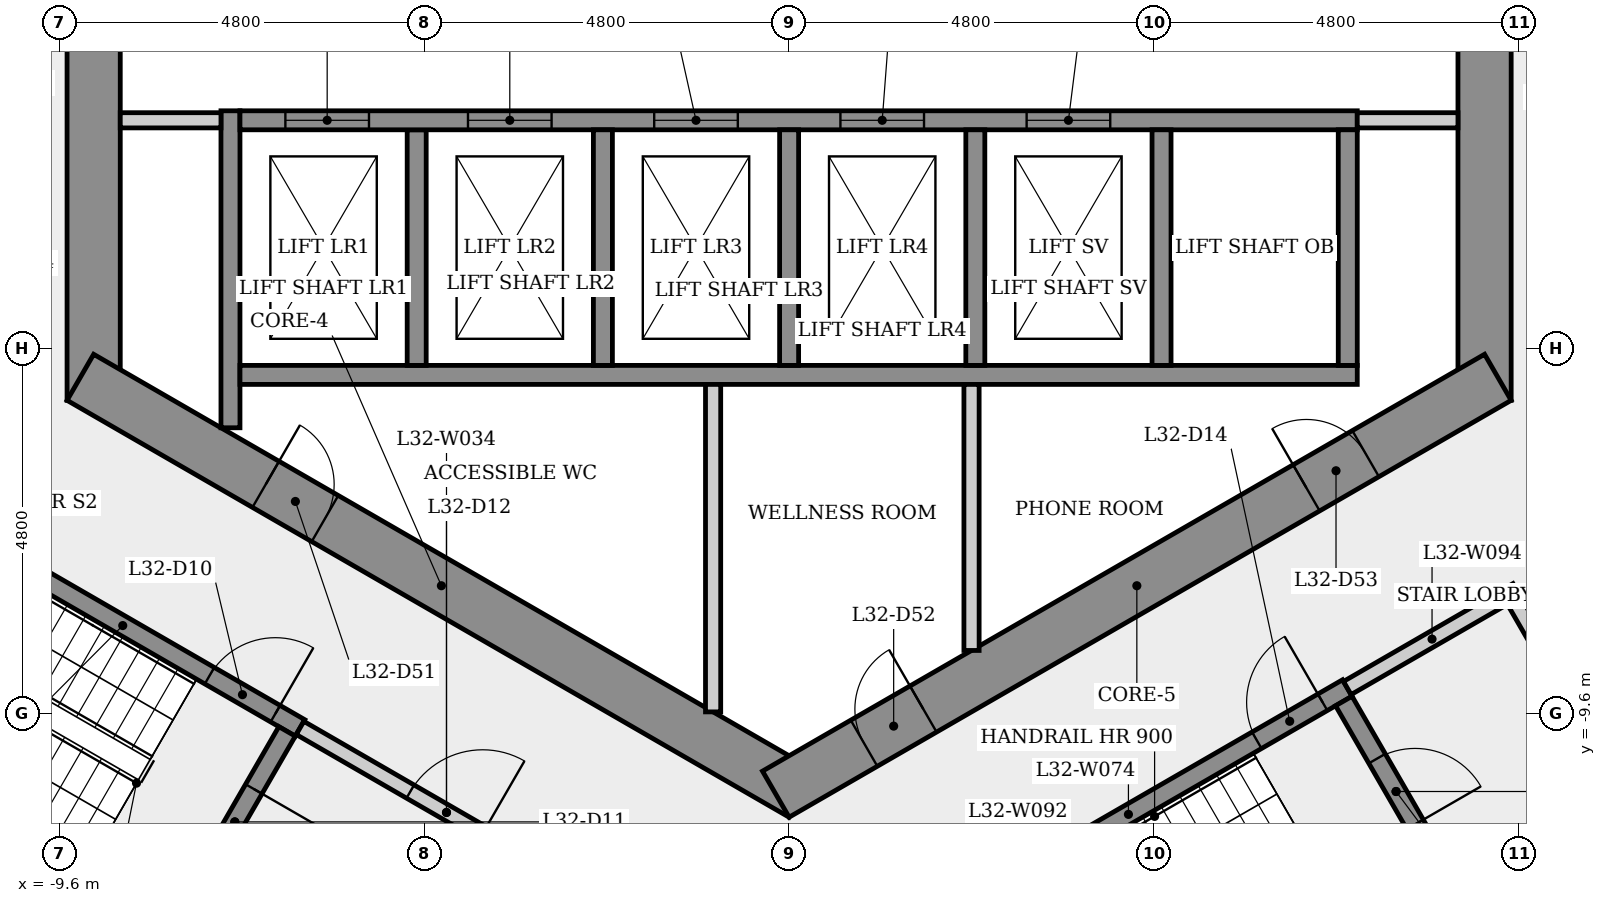
"""IFC4 building model, lengths in metres.
Left out: names, types, materials, properties, quantities, classifications, styles, units other than length and angle.
Written with IfcOpenShell. Run it as: python <this file> out.ifc"""

import sys

from ifc_helpers import new_model, si_unit, direction, frame, frame_2d, origin, place, context, subcontext, project, spatial, rectangle, extrude, element, fill, save


model = new_model("IFC4")
c1 = context("Model", 3, precision=1e-05, world=origin(), true_north=direction((0.0, 1.0)))
c2 = subcontext(c1, "Body", "Model", "MODEL_VIEW")
j1 = project(units=[si_unit("LENGTHUNIT", "METRE"), si_unit("PLANEANGLEUNIT", "RADIAN")], contexts=[c1])
p1 = place(None, origin())
s1 = spatial("IfcSite", under=j1, at=p1, CompositionType="ELEMENT")
p2 = place(p1, origin())
s2 = spatial("IfcBuilding", under=s1, at=p2, CompositionType="ELEMENT")
p3 = place(p2, frame((0.0, 0.0, 120.5)))
s3 = spatial("IfcBuildingStorey", under=s2, at=p3, CompositionType="ELEMENT", Elevation=120.5)
p4 = place(p3, frame((9.15, -5.485, 0.0), z_axis=(0.0, 0.0, 1.0), x_axis=(0.0, 1.0, 0.0)))
e1 = element("IfcWall", 1, at=p4, inside=s3, PredefinedType="SHEAR", context=c2, shape_type="SweptSolid", body=[
    extrude(rectangle(XDim=10.97, YDim=0.7, at=frame_2d((5.485, 0.0))), origin(), (0.0, 0.0, 1.0), 4.0),
])
p5 = place(p4, frame((4.685, 0.0, 0.0)))
e2 = element("IfcOpeningElement", 2, at=p5, cuts=e1, PredefinedType="OPENING", context=c2, shape_type="SweptSolid", body=[
    extrude(rectangle(XDim=1.6, YDim=2.1, at=frame_2d((0.8, 1.05))), frame((0.0, 0.36, 0.0), z_axis=(0.0, -1.0, 0.0), x_axis=(1.0, 0.0, 0.0)), (0.0, 0.0, 1.0), 0.72),
])
p6 = place(p3, frame((-9.15, 5.485, 0.0), z_axis=(0.0, 0.0, 1.0), x_axis=(0.0, -1.0, 0.0)))
e3 = element("IfcWall", 3, at=p6, inside=s3, PredefinedType="SHEAR", context=c2, shape_type="SweptSolid", body=[
    extrude(rectangle(XDim=10.97, YDim=0.7, at=frame_2d((5.485, 0.0))), origin(), (0.0, 0.0, 1.0), 4.0),
])
p7 = place(p6, frame((4.685, 0.0, 0.0)))
e4 = element("IfcOpeningElement", 4, at=p7, cuts=e3, PredefinedType="OPENING", context=c2, shape_type="SweptSolid", body=[
    extrude(rectangle(XDim=1.6, YDim=2.1, at=frame_2d((0.8, 1.05))), frame((0.0, 0.36, 0.0), z_axis=(0.0, -1.0, 0.0), x_axis=(1.0, 0.0, 0.0)), (0.0, 0.0, 1.0), 0.72),
])
p8 = place(p3, frame((-9.325, -5.182, 0.0), z_axis=(0.0, 0.0, 1.0), x_axis=(0.866023993627, -0.500002442456, 0.0)))
e5 = element("IfcWall", 5, at=p8, inside=s3, PredefinedType="SHEAR", context=c2, shape_type="SweptSolid", body=[
    extrude(rectangle(XDim=10.97, YDim=0.7, at=frame_2d((5.485, 0.0))), origin(), (0.0, 0.0, 1.0), 4.0),
])
p9 = place(p8, frame((2.817, 0.0, 0.0)))
e6 = element("IfcOpeningElement", 6, at=p9, cuts=e5, PredefinedType="OPENING", context=c2, shape_type="SweptSolid", body=[
    extrude(rectangle(XDim=0.9, YDim=2.1, at=frame_2d((0.45, 1.05))), frame((0.0, 0.36, 0.0), z_axis=(0.0, -1.0, 0.0), x_axis=(1.0, 0.0, 0.0)), (0.0, 0.0, 1.0), 0.72),
])
p10 = place(p3, frame((-0.175, -10.667, 0.0), z_axis=(0.0, 0.0, 1.0), x_axis=(0.866023993627, 0.500002442456, 0.0)))
e7 = element("IfcWall", 7, at=p10, inside=s3, PredefinedType="SHEAR", context=c2, shape_type="SweptSolid", body=[
    extrude(rectangle(XDim=10.97, YDim=0.7, at=frame_2d((5.485, 0.0))), origin(), (0.0, 0.0, 1.0), 4.0),
])
p11 = place(p10, frame((1.34, 0.0, 0.0)))
e8 = element("IfcOpeningElement", 8, at=p11, cuts=e7, PredefinedType="OPENING", context=c2, shape_type="SweptSolid", body=[
    extrude(rectangle(XDim=0.9, YDim=2.1, at=frame_2d((0.45, 1.05))), frame((0.0, 0.36, 0.0), z_axis=(0.0, -1.0, 0.0), x_axis=(1.0, 0.0, 0.0)), (0.0, 0.0, 1.0), 0.72),
])
p12 = place(p10, frame((8.061, 0.0, 0.0)))
e9 = element("IfcOpeningElement", 9, at=p12, cuts=e7, PredefinedType="OPENING", context=c2, shape_type="SweptSolid", body=[
    extrude(rectangle(XDim=0.9, YDim=2.1, at=frame_2d((0.45, 1.05))), frame((0.0, 0.36, 0.0), z_axis=(0.0, -1.0, 0.0), x_axis=(1.0, 0.0, 0.0)), (0.0, 0.0, 1.0), 0.72),
])
p13 = place(p3, frame((-11.1, -7.101, 0.0), z_axis=(0.0, 0.0, 1.0), x_axis=(0.866028615007, -0.499994437958, 0.0)))
e10 = element("IfcWall", 10, at=p13, inside=s3, PredefinedType="SHEAR", context=c2, shape_type="SweptSolid", body=[
    extrude(rectangle(XDim=5.387, YDim=0.25, at=frame_2d((2.694, 0.0))), origin(), (0.0, 0.0, 1.0), 3.6),
])
p14 = place(p13, frame((4.012, 0.0, 0.0)))
e11 = element("IfcOpeningElement", 11, at=p14, cuts=e10, PredefinedType="OPENING", context=c2, shape_type="SweptSolid", body=[
    extrude(rectangle(XDim=1.0, YDim=2.1, at=frame_2d((0.5, 1.05))), frame((0.0, 0.135, 0.0), z_axis=(0.0, -1.0, 0.0), x_axis=(1.0, 0.0, 0.0)), (0.0, 0.0, 1.0), 0.27),
])
p15 = place(p3, frame((-7.935, -12.393, 0.0), z_axis=(0.0, 0.0, 1.0), x_axis=(-0.866025499775, 0.499999833739, 0.0)))
e12 = element("IfcWall", 12, at=p15, inside=s3, PredefinedType="SHEAR", context=c2, shape_type="SweptSolid", body=[
    extrude(rectangle(XDim=6.4, YDim=0.25, at=frame_2d((3.2, 0.0))), origin(), (0.0, 0.0, 1.0), 3.6),
])
p16 = place(p3, frame((-7.35, -5.846, 0.0), z_axis=(0.0, 0.0, 1.0), x_axis=(0.0, 1.0, 0.0)))
e13 = element("IfcWall", 13, at=p16, inside=s3, PredefinedType="SHEAR", context=c2, shape_type="SweptSolid", body=[
    extrude(rectangle(XDim=4.171, YDim=0.25, at=frame_2d((2.085, 0.0))), origin(), (0.0, 0.0, 1.0), 3.6),
])
p17 = place(p3, frame((-7.475, -1.8, 0.0), z_axis=(0.0, 0.0, 1.0), x_axis=(-1.0, 0.0, 0.0)))
e14 = element("IfcWall", 14, at=p17, inside=s3, PredefinedType="PARTITIONING", context=c2, shape_type="SweptSolid", body=[
    extrude(rectangle(XDim=1.325, YDim=0.2, at=frame_2d((0.663, 0.0))), origin(), (0.0, 0.0, 1.0), 3.6),
])
p18 = place(p3, frame((-6.605, -9.841, 0.0), z_axis=(0.0, 0.0, 1.0), x_axis=(-0.499996545922, -0.866027397988, 0.0)))
e15 = element("IfcWall", 15, at=p18, inside=s3, PredefinedType="SHEAR", context=c2, shape_type="SweptSolid", body=[
    extrude(rectangle(XDim=2.75, YDim=0.25, at=frame_2d((1.375, 0.0))), origin(), (0.0, 0.0, 1.0), 3.6),
])
p19 = place(p18, frame((0.875, 0.0, 0.0)))
e16 = element("IfcOpeningElement", 16, at=p19, cuts=e15, PredefinedType="OPENING", context=c2, shape_type="SweptSolid", body=[
    extrude(rectangle(XDim=1.0, YDim=2.1, at=frame_2d((0.5, 1.05))), frame((0.0, 0.135, 0.0), z_axis=(0.0, -1.0, 0.0), x_axis=(1.0, 0.0, 0.0)), (0.0, 0.0, 1.0), 0.27),
])
p20 = place(p3, frame((-6.435, -9.795, 0.0), z_axis=(0.0, 0.0, 1.0), x_axis=(0.866012907634, -0.500021643343, 0.0)))
e17 = element("IfcWall", 17, at=p20, inside=s3, PredefinedType="PARTITIONING", context=c2, shape_type="SweptSolid", body=[
    extrude(rectangle(XDim=4.45, YDim=0.2, at=frame_2d((2.225, 0.0))), origin(), (0.0, 0.0, 1.0), 3.6),
])
p21 = place(p20, frame((1.675, 0.0, 0.0)))
e18 = element("IfcOpeningElement", 18, at=p21, cuts=e17, PredefinedType="OPENING", context=c2, shape_type="SweptSolid", body=[
    extrude(rectangle(XDim=1.1, YDim=2.1, at=frame_2d((0.55, 1.05))), frame((0.0, 0.11, 0.0), z_axis=(0.0, -1.0, 0.0), x_axis=(1.0, 0.0, 0.0)), (0.0, 0.0, 1.0), 0.22),
])
p22 = place(p3, frame((-7.225, -5.15, 0.0), z_axis=(0.0, 0.0, 1.0), x_axis=(1.0, 0.0, 0.0)))
e19 = element("IfcWall", 19, at=p22, inside=s3, PredefinedType="SHEAR", context=c2, shape_type="SweptSolid", body=[
    extrude(rectangle(XDim=14.7, YDim=0.25, at=frame_2d((7.35, 0.0))), origin(), (0.0, 0.0, 1.0), 3.6),
])
p23 = place(p3, frame((-4.9, -1.925, 0.0), z_axis=(0.0, 0.0, 1.0), x_axis=(0.0, -1.0, 0.0)))
e20 = element("IfcWall", 20, at=p23, inside=s3, PredefinedType="SHEAR", context=c2, shape_type="SweptSolid", body=[
    extrude(rectangle(XDim=3.1, YDim=0.25, at=frame_2d((1.55, 0.0))), origin(), (0.0, 0.0, 1.0), 4.0),
])
p24 = place(p3, frame((-7.225, -1.8, 0.0), z_axis=(0.0, 0.0, 1.0), x_axis=(1.0, 0.0, 0.0)))
e21 = element("IfcWall", 21, at=p24, inside=s3, PredefinedType="SHEAR", context=c2, shape_type="SweptSolid", body=[
    extrude(rectangle(XDim=14.7, YDim=0.25, at=frame_2d((7.35, 0.0))), origin(), (0.0, 0.0, 1.0), 3.6),
])
p25 = place(p24, frame((0.597, 0.0, 0.0)))
e22 = element("IfcOpeningElement", 22, at=p25, cuts=e21, PredefinedType="OPENING", context=c2, shape_type="SweptSolid", body=[
    extrude(rectangle(XDim=1.1, YDim=2.1, at=frame_2d((0.55, 1.05))), frame((0.0, 0.135, 0.0), z_axis=(0.0, -1.0, 0.0), x_axis=(1.0, 0.0, 0.0)), (0.0, 0.0, 1.0), 0.27),
])
p26 = place(p24, frame((3.0, 0.0, 0.0)))
e23 = element("IfcOpeningElement", 23, at=p26, cuts=e21, PredefinedType="OPENING", context=c2, shape_type="SweptSolid", body=[
    extrude(rectangle(XDim=1.1, YDim=2.1, at=frame_2d((0.55, 1.05))), frame((0.0, 0.135, 0.0), z_axis=(0.0, -1.0, 0.0), x_axis=(1.0, 0.0, 0.0)), (0.0, 0.0, 1.0), 0.27),
])
p27 = place(p24, frame((5.45, 0.0, 0.0)))
e24 = element("IfcOpeningElement", 24, at=p27, cuts=e21, PredefinedType="OPENING", context=c2, shape_type="SweptSolid", body=[
    extrude(rectangle(XDim=1.1, YDim=2.1, at=frame_2d((0.55, 1.05))), frame((0.0, 0.135, 0.0), z_axis=(0.0, -1.0, 0.0), x_axis=(1.0, 0.0, 0.0)), (0.0, 0.0, 1.0), 0.27),
])
p28 = place(p24, frame((7.9, 0.0, 0.0)))
e25 = element("IfcOpeningElement", 25, at=p28, cuts=e21, PredefinedType="OPENING", context=c2, shape_type="SweptSolid", body=[
    extrude(rectangle(XDim=1.1, YDim=2.1, at=frame_2d((0.55, 1.05))), frame((0.0, 0.135, 0.0), z_axis=(0.0, -1.0, 0.0), x_axis=(1.0, 0.0, 0.0)), (0.0, 0.0, 1.0), 0.27),
])
p29 = place(p24, frame((10.35, 0.0, 0.0)))
e26 = element("IfcOpeningElement", 26, at=p29, cuts=e21, PredefinedType="OPENING", context=c2, shape_type="SweptSolid", body=[
    extrude(rectangle(XDim=1.1, YDim=2.1, at=frame_2d((0.55, 1.05))), frame((0.0, 0.135, 0.0), z_axis=(0.0, -1.0, 0.0), x_axis=(1.0, 0.0, 0.0)), (0.0, 0.0, 1.0), 0.27),
])
p30 = place(p3, frame((-2.45, -1.925, 0.0), z_axis=(0.0, 0.0, 1.0), x_axis=(0.0, -1.0, 0.0)))
e27 = element("IfcWall", 27, at=p30, inside=s3, PredefinedType="SHEAR", context=c2, shape_type="SweptSolid", body=[
    extrude(rectangle(XDim=3.1, YDim=0.25, at=frame_2d((1.55, 0.0))), origin(), (0.0, 0.0, 1.0), 4.0),
])
p31 = place(p3, frame((-1.0, -5.275, 0.0), z_axis=(0.0, 0.0, 1.0), x_axis=(0.0, -1.0, 0.0)))
e28 = element("IfcWall", 28, at=p31, inside=s3, PredefinedType="PARTITIONING", context=c2, shape_type="SweptSolid", body=[
    extrude(rectangle(XDim=4.309, YDim=0.2, at=frame_2d((2.155, 0.0))), origin(), (0.0, 0.0, 1.0), 3.6),
])
p32 = place(p3, frame((0.0, -1.925, 0.0), z_axis=(0.0, 0.0, 1.0), x_axis=(0.0, -1.0, 0.0)))
e29 = element("IfcWall", 29, at=p32, inside=s3, PredefinedType="SHEAR", context=c2, shape_type="SweptSolid", body=[
    extrude(rectangle(XDim=3.1, YDim=0.25, at=frame_2d((1.55, 0.0))), origin(), (0.0, 0.0, 1.0), 4.0),
])
p33 = place(p3, frame((1.585, -12.595, 0.0), z_axis=(0.0, 0.0, 1.0), x_axis=(0.866036417653, 0.499980922934, 0.0)))
e30 = element("IfcWall", 30, at=p33, inside=s3, PredefinedType="SHEAR", context=c2, shape_type="SweptSolid", body=[
    extrude(rectangle(XDim=6.65, YDim=0.25, at=frame_2d((3.325, 0.0))), origin(), (0.0, 0.0, 1.0), 3.6),
])
p34 = place(p33, frame((5.275, 0.0, 0.0)))
e31 = element("IfcOpeningElement", 31, at=p34, cuts=e30, PredefinedType="OPENING", context=c2, shape_type="SweptSolid", body=[
    extrude(rectangle(XDim=1.0, YDim=2.1, at=frame_2d((0.5, 1.05))), frame((0.0, 0.135, 0.0), z_axis=(0.0, -1.0, 0.0), x_axis=(1.0, 0.0, 0.0)), (0.0, 0.0, 1.0), 0.27),
])
p35 = place(p3, frame((2.4, -5.275, 0.0), z_axis=(0.0, 0.0, 1.0), x_axis=(0.0, -1.0, 0.0)))
e32 = element("IfcWall", 32, at=p35, inside=s3, PredefinedType="PARTITIONING", context=c2, shape_type="SweptSolid", body=[
    extrude(rectangle(XDim=3.501, YDim=0.2, at=frame_2d((1.75, 0.0))), origin(), (0.0, 0.0, 1.0), 3.6),
])
for number, where, z_axis, x_axis in (
    (33, (2.45, -1.925, 0.0), (0.0, 0.0, 1.0), (0.0, -1.0, 0.0)),
    (34, (4.9, -1.925, 0.0), (0.0, 0.0, 1.0), (0.0, -1.0, 0.0)),
):
    element("IfcWall", number, at=place(p3, frame(where, z_axis=z_axis, x_axis=x_axis)), inside=s3, PredefinedType="SHEAR", context=c2, shape_type="SweptSolid", body=[
        extrude(rectangle(XDim=3.1, YDim=0.25, at=frame_2d((1.55, 0.0))), origin(), (0.0, 0.0, 1.0), 4.0),
    ])
p36 = place(p3, frame((7.298, -9.441, 0.0), z_axis=(0.0, 0.0, 1.0), x_axis=(0.500034990121, -0.866005201286, 0.0)))
e35 = element("IfcWall", 35, at=p36, inside=s3, PredefinedType="SHEAR", context=c2, shape_type="SweptSolid", body=[
    extrude(rectangle(XDim=2.75, YDim=0.25, at=frame_2d((1.375, 0.0))), origin(), (0.0, 0.0, 1.0), 3.6),
])
p37 = place(p36, frame((0.875, 0.0, 0.0)))
e36 = element("IfcOpeningElement", 36, at=p37, cuts=e35, PredefinedType="OPENING", context=c2, shape_type="SweptSolid", body=[
    extrude(rectangle(XDim=1.0, YDim=2.1, at=frame_2d((0.5, 1.05))), frame((0.0, 0.135, 0.0), z_axis=(0.0, -1.0, 0.0), x_axis=(1.0, 0.0, 0.0)), (0.0, 0.0, 1.0), 0.27),
])
p38 = place(p3, frame((7.344, -9.27, 0.0), z_axis=(0.0, 0.0, 1.0), x_axis=(0.866005588531, 0.500034319456, 0.0)))
e37 = element("IfcWall", 37, at=p38, inside=s3, PredefinedType="PARTITIONING", context=c2, shape_type="SweptSolid", body=[
    extrude(rectangle(XDim=2.575, YDim=0.2, at=frame_2d((1.288, 0.0))), origin(), (0.0, 0.0, 1.0), 3.6),
])
p39 = place(p3, frame((7.35, -1.925, 0.0), z_axis=(0.0, 0.0, 1.0), x_axis=(0.0, -1.0, 0.0)))
e38 = element("IfcWall", 38, at=p39, inside=s3, PredefinedType="SHEAR", context=c2, shape_type="SweptSolid", body=[
    extrude(rectangle(XDim=3.1, YDim=0.25, at=frame_2d((1.55, 0.0))), origin(), (0.0, 0.0, 1.0), 4.0),
])
p40 = place(p3, frame((8.8, -1.8, 0.0), z_axis=(0.0, 0.0, 1.0), x_axis=(-1.0, 0.0, 0.0)))
e39 = element("IfcWall", 39, at=p40, inside=s3, PredefinedType="PARTITIONING", context=c2, shape_type="SweptSolid", body=[
    extrude(rectangle(XDim=1.325, YDim=0.2, at=frame_2d((0.663, 0.0))), origin(), (0.0, 0.0, 1.0), 3.6),
])
p41 = place(p3, frame((9.537, -8.119, 0.0), z_axis=(0.0, 0.0, 1.0), x_axis=(0.499990139034, -0.866031096941, 0.0)))
e40 = element("IfcWall", 40, at=p41, inside=s3, PredefinedType="PARTITIONING", context=c2, shape_type="SweptSolid", body=[
    extrude(rectangle(XDim=3.0, YDim=0.2, at=frame_2d((1.5, 0.0))), origin(), (0.0, 0.0, 1.0), 3.6),
])
p42 = place(p41, frame((0.935, 0.0, 0.0)))
e41 = element("IfcOpeningElement", 41, at=p42, cuts=e40, PredefinedType="OPENING", context=c2, shape_type="SweptSolid", body=[
    extrude(rectangle(XDim=1.0, YDim=2.1, at=frame_2d((0.5, 1.05))), frame((0.0, 0.11, 0.0), z_axis=(0.0, -1.0, 0.0), x_axis=(1.0, 0.0, 0.0)), (0.0, 0.0, 1.0), 0.22),
])
p43 = place(p3, frame((10.901, -10.681, 0.0), z_axis=(0.0, 0.0, 1.0), x_axis=(-0.866007538022, -0.500030943131, 0.0)))
e42 = element("IfcWall", 42, at=p43, inside=s3, PredefinedType="PLUMBINGWALL", context=c2, shape_type="SweptSolid", body=[
    extrude(rectangle(XDim=2.375, YDim=0.2, at=frame_2d((1.188, 0.0))), origin(), (0.0, 0.0, 1.0), 3.6),
])
p44 = place(p25, origin())
e43 = element("IfcDoor", 43, at=p44, inside=s3, OperationType="SLIDING_TO_LEFT", PredefinedType="DOOR", context=c2, shape_type="SweptSolid", body=[
    extrude(rectangle(XDim=1.1, YDim=2.1, at=frame_2d((0.55, 1.05))), frame((0.0, 0.025, 0.0), z_axis=(0.0, -1.0, 0.0), x_axis=(1.0, 0.0, 0.0)), (0.0, 0.0, 1.0), 0.05),
])
fill(e22, e43)
p45 = place(p26, origin())
e44 = element("IfcDoor", 44, at=p45, inside=s3, OperationType="SLIDING_TO_LEFT", PredefinedType="DOOR", context=c2, shape_type="SweptSolid", body=[
    extrude(rectangle(XDim=1.1, YDim=2.1, at=frame_2d((0.55, 1.05))), frame((0.0, 0.025, 0.0), z_axis=(0.0, -1.0, 0.0), x_axis=(1.0, 0.0, 0.0)), (0.0, 0.0, 1.0), 0.05),
])
fill(e23, e44)
p46 = place(p27, origin())
e45 = element("IfcDoor", 45, at=p46, inside=s3, OperationType="SLIDING_TO_LEFT", PredefinedType="DOOR", context=c2, shape_type="SweptSolid", body=[
    extrude(rectangle(XDim=1.1, YDim=2.1, at=frame_2d((0.55, 1.05))), frame((0.0, 0.025, 0.0), z_axis=(0.0, -1.0, 0.0), x_axis=(1.0, 0.0, 0.0)), (0.0, 0.0, 1.0), 0.05),
])
fill(e24, e45)
p47 = place(p28, origin())
e46 = element("IfcDoor", 46, at=p47, inside=s3, OperationType="SLIDING_TO_LEFT", PredefinedType="DOOR", context=c2, shape_type="SweptSolid", body=[
    extrude(rectangle(XDim=1.1, YDim=2.1, at=frame_2d((0.55, 1.05))), frame((0.0, 0.025, 0.0), z_axis=(0.0, -1.0, 0.0), x_axis=(1.0, 0.0, 0.0)), (0.0, 0.0, 1.0), 0.05),
])
fill(e25, e46)
p48 = place(p29, origin())
e47 = element("IfcDoor", 47, at=p48, inside=s3, OperationType="SLIDING_TO_LEFT", PredefinedType="DOOR", context=c2, shape_type="SweptSolid", body=[
    extrude(rectangle(XDim=1.1, YDim=2.1, at=frame_2d((0.55, 1.05))), frame((0.0, 0.025, 0.0), z_axis=(0.0, -1.0, 0.0), x_axis=(1.0, 0.0, 0.0)), (0.0, 0.0, 1.0), 0.05),
])
fill(e26, e47)
p49 = place(p14, origin())
e48 = element("IfcDoor", 48, at=p49, inside=s3, OperationType="SINGLE_SWING_RIGHT", PredefinedType="DOOR", context=c2, shape_type="SweptSolid", body=[
    extrude(rectangle(XDim=1.0, YDim=2.1, at=frame_2d((0.5, 1.05))), frame((0.0, 0.025, 0.0), z_axis=(0.0, -1.0, 0.0), x_axis=(1.0, 0.0, 0.0)), (0.0, 0.0, 1.0), 0.05),
])
fill(e11, e48)
p50 = place(p19, origin())
e49 = element("IfcDoor", 49, at=p50, inside=s3, OperationType="SINGLE_SWING_LEFT", PredefinedType="DOOR", context=c2, shape_type="SweptSolid", body=[
    extrude(rectangle(XDim=1.0, YDim=2.1, at=frame_2d((0.5, 1.05))), frame((0.0, 0.025, 0.0), z_axis=(0.0, -1.0, 0.0), x_axis=(1.0, 0.0, 0.0)), (0.0, 0.0, 1.0), 0.05),
])
fill(e16, e49)
p51 = place(p21, origin())
e50 = element("IfcDoor", 50, at=p51, inside=s3, OperationType="SINGLE_SWING_RIGHT", PredefinedType="DOOR", context=c2, shape_type="SweptSolid", body=[
    extrude(rectangle(XDim=1.1, YDim=2.1, at=frame_2d((0.55, 1.05))), frame((0.0, 0.025, 0.0), z_axis=(0.0, -1.0, 0.0), x_axis=(1.0, 0.0, 0.0)), (0.0, 0.0, 1.0), 0.05),
])
fill(e18, e50)
p52 = place(p34, origin())
e51 = element("IfcDoor", 51, at=p52, inside=s3, OperationType="SINGLE_SWING_RIGHT", PredefinedType="DOOR", context=c2, shape_type="SweptSolid", body=[
    extrude(rectangle(XDim=1.0, YDim=2.1, at=frame_2d((0.5, 1.05))), frame((0.0, 0.025, 0.0), z_axis=(0.0, -1.0, 0.0), x_axis=(1.0, 0.0, 0.0)), (0.0, 0.0, 1.0), 0.05),
])
fill(e31, e51)
p53 = place(p37, origin())
e52 = element("IfcDoor", 52, at=p53, inside=s3, OperationType="SINGLE_SWING_RIGHT", PredefinedType="DOOR", context=c2, shape_type="SweptSolid", body=[
    extrude(rectangle(XDim=1.0, YDim=2.1, at=frame_2d((0.5, 1.05))), frame((0.0, 0.025, 0.0), z_axis=(0.0, -1.0, 0.0), x_axis=(1.0, 0.0, 0.0)), (0.0, 0.0, 1.0), 0.05),
])
fill(e36, e52)
p54 = place(p9, origin())
e53 = element("IfcDoor", 53, at=p54, inside=s3, OperationType="SINGLE_SWING_LEFT", PredefinedType="DOOR", context=c2, shape_type="SweptSolid", body=[
    extrude(rectangle(XDim=0.9, YDim=2.1, at=frame_2d((0.45, 1.05))), frame((0.0, 0.025, 0.0), z_axis=(0.0, -1.0, 0.0), x_axis=(1.0, 0.0, 0.0)), (0.0, 0.0, 1.0), 0.05),
])
fill(e6, e53)
p55 = place(p11, origin())
e54 = element("IfcDoor", 54, at=p55, inside=s3, OperationType="SINGLE_SWING_RIGHT", PredefinedType="DOOR", context=c2, shape_type="SweptSolid", body=[
    extrude(rectangle(XDim=0.9, YDim=2.1, at=frame_2d((0.45, 1.05))), frame((0.0, 0.025, 0.0), z_axis=(0.0, -1.0, 0.0), x_axis=(1.0, 0.0, 0.0)), (0.0, 0.0, 1.0), 0.05),
])
fill(e8, e54)
p56 = place(p12, origin())
e55 = element("IfcDoor", 55, at=p56, inside=s3, OperationType="SINGLE_SWING_LEFT", PredefinedType="DOOR", context=c2, shape_type="SweptSolid", body=[
    extrude(rectangle(XDim=0.9, YDim=2.1, at=frame_2d((0.45, 1.05))), frame((0.0, 0.025, 0.0), z_axis=(0.0, -1.0, 0.0), x_axis=(1.0, 0.0, 0.0)), (0.0, 0.0, 1.0), 0.05),
])
fill(e9, e55)
save(model, sys.argv[1])
